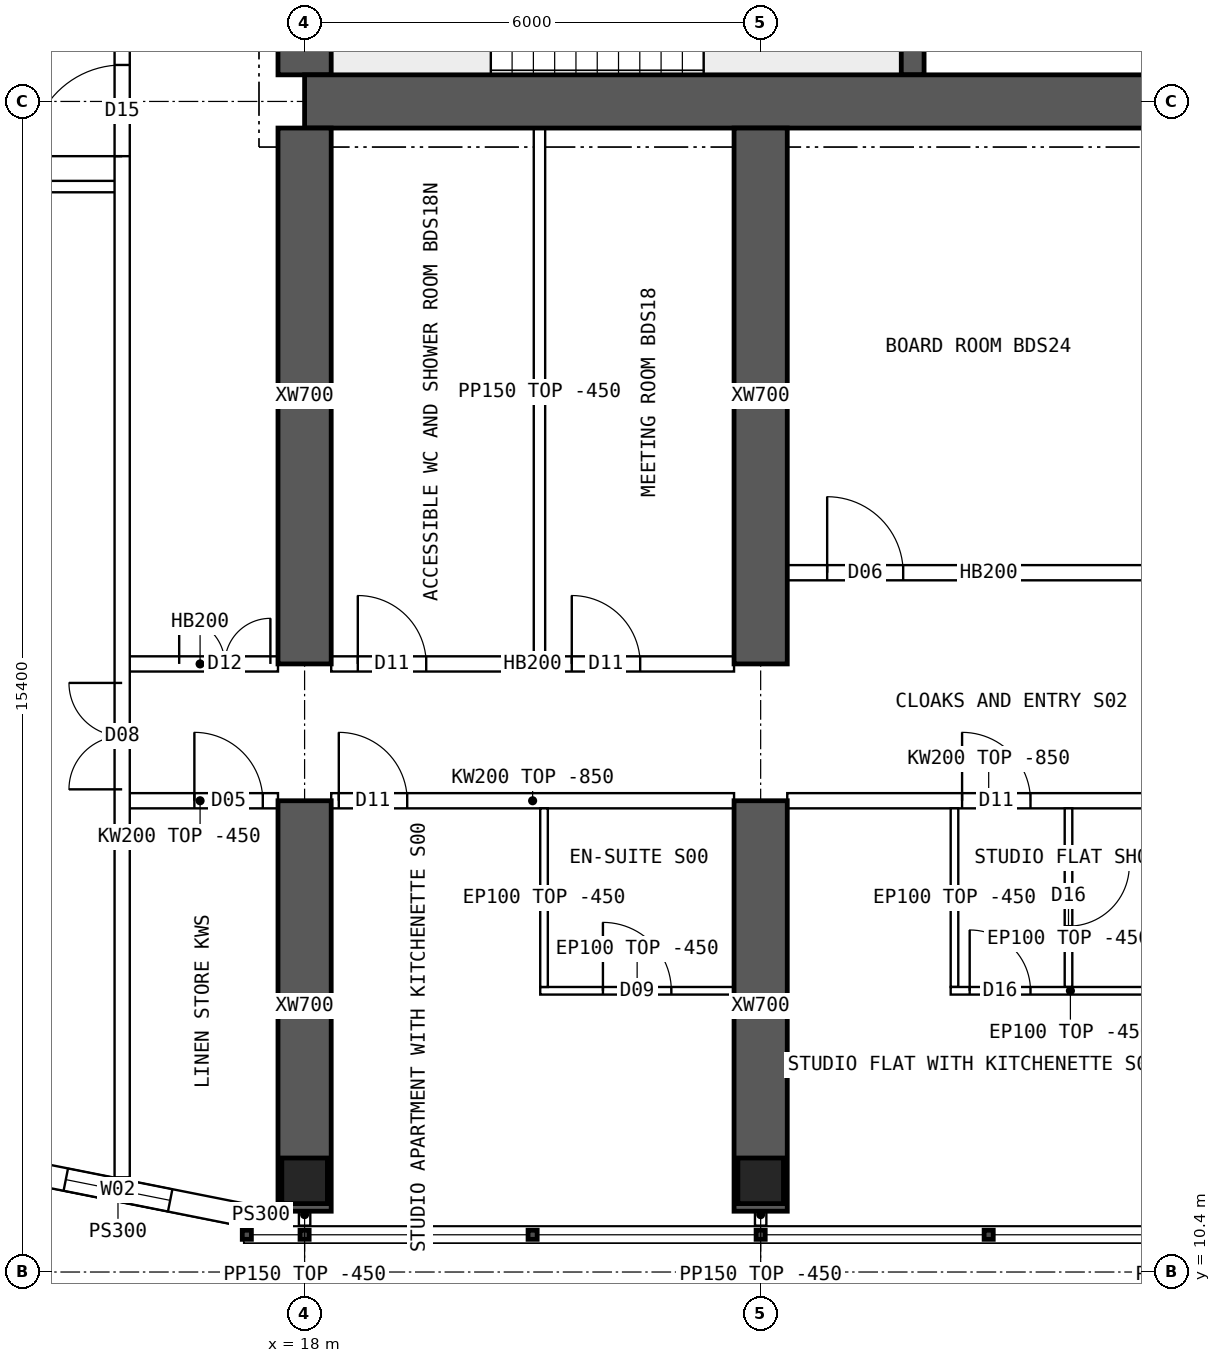
"""IFC4 building model, lengths in metres.
Left out: names, types, materials, properties, quantities, classifications, styles, units other than length and angle.
Written with IfcOpenShell. Run it as: python <this file> out.ifc"""

import sys

from ifc_helpers import new_model, si_unit, direction, frame, frame_2d, origin, origin_2d, place, context, subcontext, project, spatial, polyline, rectangle, hollow_rectangle, outline, extrude, element, fill, save


model = new_model("IFC4")
c1 = context("Model", 3, precision=1e-05, world=origin(), true_north=direction((0.0, 1.0)))
c2 = subcontext(c1, "Body", "Model", "MODEL_VIEW")
j1 = project(units=[si_unit("LENGTHUNIT", "METRE"), si_unit("PLANEANGLEUNIT", "RADIAN")], contexts=[c1])
p1 = place(None, origin())
s1 = spatial("IfcSite", under=j1, at=p1, CompositionType="ELEMENT")
p2 = place(p1, origin())
s2 = spatial("IfcBuilding", under=s1, at=p2, CompositionType="ELEMENT")
p3 = place(p2, frame((0.0, 0.0, 212.8)))
s3 = spatial("IfcBuildingStorey", under=s2, at=p3, CompositionType="ELEMENT", Elevation=212.8)
for number, where, z_axis, x_axis in (
    (1, (18.0, 11.6, 0.0), (0.0, 0.0, 1.0), (1.0, 0.0, 0.0)),
    (2, (24.0, 11.6, 0.0), (0.0, 0.0, 1.0), (1.0, 0.0, 0.0)),
):
    element("IfcColumn", number, at=place(p3, frame(where, z_axis=z_axis, x_axis=x_axis)), inside=s3, PredefinedType="COLUMN", context=c2, shape_type="SweptSolid", body=[
        extrude(hollow_rectangle(XDim=0.6, YDim=0.6, WallThickness=0.06, at=origin_2d()), origin(), (0.0, 0.0, 1.0), 3.75),
    ])
p4 = place(p3, frame((18.0, 25.8, 0.0), z_axis=(0.0, 0.0, 1.0), x_axis=(1.0, 0.0, 0.0)))
e3 = element("IfcWall", 3, at=p4, inside=s3, PredefinedType="SHEAR", context=c2, shape_type="SweptSolid", body=[
    extrude(rectangle(XDim=48.0, YDim=0.7, at=frame_2d((24.0, 0.0))), origin(), (0.0, 0.0, 1.0), 3.75),
])
p5 = place(p3, frame((18.0, 26.15, 0.0), z_axis=(0.0, 0.0, 1.0), x_axis=(0.0, 1.0, 0.0)))
e4 = element("IfcWall", 4, at=p5, inside=s3, PredefinedType="SHEAR", context=c2, shape_type="SweptSolid", body=[
    extrude(rectangle(XDim=11.7, YDim=0.7, at=frame_2d((5.85, 0.0))), origin(), (0.0, 0.0, 1.0), 3.75),
])
p6 = place(p5, frame((5.15, 0.0, 0.0)))
e5 = element("IfcOpeningElement", 5, at=p6, cuts=e4, PredefinedType="OPENING", context=c2, shape_type="SweptSolid", body=[
    extrude(rectangle(XDim=1.2, YDim=2.1, at=frame_2d((0.6, 1.05))), frame((0.0, 0.36, 0.0), z_axis=(0.0, -1.0, 0.0), x_axis=(1.0, 0.0, 0.0)), (0.0, 0.0, 1.0), 0.72),
])
p7 = place(p3, frame((26.0, 26.15, 0.0), z_axis=(0.0, 0.0, 1.0), x_axis=(0.0, 1.0, 0.0)))
e6 = element("IfcWall", 6, at=p7, inside=s3, PredefinedType="SHEAR", context=c2, shape_type="SweptSolid", body=[
    extrude(rectangle(XDim=4.1, YDim=0.3, at=frame_2d((2.05, 0.0))), origin(), (0.0, 0.0, 1.0), 3.75),
])
p8 = place(p3, frame((18.0, 11.2, 0.0), z_axis=(0.0, 0.0, 1.0), x_axis=(0.0, 1.0, 0.0)))
e7 = element("IfcWall", 7, at=p8, inside=s3, PredefinedType="SHEAR", context=c2, shape_type="SweptSolid", body=[
    extrude(rectangle(XDim=5.4, YDim=0.7, at=frame_2d((2.7, 0.0))), origin(), (0.0, 0.0, 1.0), 3.75),
])
p9 = place(p3, frame((18.0, 18.4, 0.0), z_axis=(0.0, 0.0, 1.0), x_axis=(0.0, 1.0, 0.0)))
e8 = element("IfcWall", 8, at=p9, inside=s3, PredefinedType="SHEAR", context=c2, shape_type="SweptSolid", body=[
    extrude(rectangle(XDim=7.05, YDim=0.7, at=frame_2d((3.525, 0.0))), origin(), (0.0, 0.0, 1.0), 3.75),
])
p10 = place(p3, frame((24.0, 11.2, 0.0), z_axis=(0.0, 0.0, 1.0), x_axis=(0.0, 1.0, 0.0)))
e9 = element("IfcWall", 9, at=p10, inside=s3, PredefinedType="SHEAR", context=c2, shape_type="SweptSolid", body=[
    extrude(rectangle(XDim=5.4, YDim=0.7, at=frame_2d((2.7, 0.0))), origin(), (0.0, 0.0, 1.0), 3.75),
])
p11 = place(p3, frame((24.0, 18.4, 0.0), z_axis=(0.0, 0.0, 1.0), x_axis=(0.0, 1.0, 0.0)))
e10 = element("IfcWall", 10, at=p11, inside=s3, PredefinedType="SHEAR", context=c2, shape_type="SweptSolid", body=[
    extrude(rectangle(XDim=7.05, YDim=0.7, at=frame_2d((3.525, 0.0))), origin(), (0.0, 0.0, 1.0), 3.75),
])
p12 = place(p3, frame((13.89, 11.808, 0.0), z_axis=(0.0, 0.0, 1.0), x_axis=(0.98078325777, -0.195100490205, 0.0)))
e11 = element("IfcWall", 11, at=p12, inside=s3, PredefinedType="SOLIDWALL", context=c2, shape_type="SweptSolid", body=[
    extrude(outline(polyline([(-0.03, -0.15), (3.405, -0.15), (3.345, 0.15), (0.03, 0.15), (-0.03, -0.15)])), origin(), (0.0, 0.0, 1.0), 3.3),
])
p13 = place(p12, frame((0.988, 0.0, 0.9)))
e12 = element("IfcOpeningElement", 12, at=p13, cuts=e11, PredefinedType="OPENING", context=c2, shape_type="SweptSolid", body=[
    extrude(rectangle(XDim=1.4, YDim=1.8, at=frame_2d((0.7, 0.9))), frame((0.0, 0.16, 0.0), z_axis=(0.0, -1.0, 0.0), x_axis=(1.0, 0.0, 0.0)), (0.0, 0.0, 1.0), 0.32),
])
p14 = place(p3, frame((17.2, 11.15, 0.0), z_axis=(0.0, 0.0, 1.0), x_axis=(1.0, 0.0, 0.0)))
e13 = element("IfcWall", 13, at=p14, inside=s3, PredefinedType="SOLIDWALL", context=c2, shape_type="SweptSolid", body=[
    extrude(rectangle(XDim=0.45, YDim=0.3, at=frame_2d((0.225, 0.0))), origin(), (0.0, 0.0, 1.0), 3.3),
])
p15 = place(p3, frame((15.6, 16.6, 0.0), z_axis=(0.0, 0.0, 1.0), x_axis=(1.0, 0.0, 0.0)))
e14 = element("IfcWall", 14, at=p15, inside=s3, PredefinedType="SOLIDWALL", context=c2, shape_type="SweptSolid", body=[
    extrude(rectangle(XDim=2.05, YDim=0.2, at=frame_2d((1.025, 0.0))), origin(), (0.0, 0.0, 1.0), 3.3),
])
p16 = place(p15, frame((0.95, 0.0, 0.0)))
e15 = element("IfcOpeningElement", 15, at=p16, cuts=e14, PredefinedType="OPENING", context=c2, shape_type="SweptSolid", body=[
    extrude(rectangle(XDim=0.9, YDim=2.1, at=frame_2d((0.45, 1.05))), frame((0.0, 0.11, 0.0), z_axis=(0.0, -1.0, 0.0), x_axis=(1.0, 0.0, 0.0)), (0.0, 0.0, 1.0), 0.22),
])
p17 = place(p3, frame((15.6, 18.4, 0.0), z_axis=(0.0, 0.0, 1.0), x_axis=(1.0, 0.0, 0.0)))
e16 = element("IfcWall", 16, at=p17, inside=s3, PredefinedType="SOLIDWALL", context=c2, shape_type="SweptSolid", body=[
    extrude(rectangle(XDim=2.05, YDim=0.2, at=frame_2d((1.025, 0.0))), origin(), (0.0, 0.0, 1.0), 3.3),
])
p18 = place(p17, frame((0.75, 0.0, 0.0)))
e17 = element("IfcOpeningElement", 17, at=p18, cuts=e16, PredefinedType="OPENING", context=c2, shape_type="SweptSolid", body=[
    extrude(rectangle(XDim=1.2, YDim=2.1, at=frame_2d((0.6, 1.05))), frame((0.0, 0.11, 0.0), z_axis=(0.0, -1.0, 0.0), x_axis=(1.0, 0.0, 0.0)), (0.0, 0.0, 1.0), 0.22),
])
p19 = place(p3, frame((18.35, 16.6, 0.0), z_axis=(0.0, 0.0, 1.0), x_axis=(1.0, 0.0, 0.0)))
e18 = element("IfcWall", 18, at=p19, inside=s3, PredefinedType="SOLIDWALL", context=c2, shape_type="SweptSolid", body=[
    extrude(outline(polyline([(0.0, 0.0), (5.3, 0.0), (5.3, 2.9), (0.0, 2.9), (0.0, 0.0)])), frame((0.0, 0.1, 0.0), z_axis=(0.0, -1.0, 0.0), x_axis=(1.0, 0.0, 0.0)), (0.0, 0.0, 1.0), 0.2),
])
p20 = place(p19, frame((0.1, 0.0, 0.0)))
e19 = element("IfcOpeningElement", 19, at=p20, cuts=e18, PredefinedType="OPENING", context=c2, shape_type="SweptSolid", body=[
    extrude(rectangle(XDim=0.9, YDim=2.1, at=frame_2d((0.45, 1.05))), frame((0.0, 0.11, 0.0), z_axis=(0.0, -1.0, 0.0), x_axis=(1.0, 0.0, 0.0)), (0.0, 0.0, 1.0), 0.22),
])
p21 = place(p3, frame((18.35, 18.4, 0.0), z_axis=(0.0, 0.0, 1.0), x_axis=(1.0, 0.0, 0.0)))
e20 = element("IfcWall", 20, at=p21, inside=s3, PredefinedType="SOLIDWALL", context=c2, shape_type="SweptSolid", body=[
    extrude(rectangle(XDim=5.3, YDim=0.2, at=frame_2d((2.65, 0.0))), origin(), (0.0, 0.0, 1.0), 3.3),
])
p22 = place(p21, frame((0.35, 0.0, 0.0)))
e21 = element("IfcOpeningElement", 21, at=p22, cuts=e20, PredefinedType="OPENING", context=c2, shape_type="SweptSolid", body=[
    extrude(rectangle(XDim=0.9, YDim=2.1, at=frame_2d((0.45, 1.05))), frame((0.0, 0.11, 0.0), z_axis=(0.0, -1.0, 0.0), x_axis=(1.0, 0.0, 0.0)), (0.0, 0.0, 1.0), 0.22),
])
p23 = place(p21, frame((3.165, 0.0, 0.0)))
e22 = element("IfcOpeningElement", 22, at=p23, cuts=e20, PredefinedType="OPENING", context=c2, shape_type="SweptSolid", body=[
    extrude(rectangle(XDim=0.9, YDim=2.1, at=frame_2d((0.45, 1.05))), frame((0.0, 0.11, 0.0), z_axis=(0.0, -1.0, 0.0), x_axis=(1.0, 0.0, 0.0)), (0.0, 0.0, 1.0), 0.22),
])
p24 = place(p3, frame((24.35, 16.6, 0.0), z_axis=(0.0, 0.0, 1.0), x_axis=(1.0, 0.0, 0.0)))
e23 = element("IfcWall", 23, at=p24, inside=s3, PredefinedType="SOLIDWALL", context=c2, shape_type="SweptSolid", body=[
    extrude(outline(polyline([(0.0, 0.0), (5.3, 0.0), (5.3, 2.9), (0.0, 2.9), (0.0, 0.0)])), frame((0.0, 0.1, 0.0), z_axis=(0.0, -1.0, 0.0), x_axis=(1.0, 0.0, 0.0)), (0.0, 0.0, 1.0), 0.2),
])
p25 = place(p24, frame((2.3, 0.0, 0.0)))
e24 = element("IfcOpeningElement", 24, at=p25, cuts=e23, PredefinedType="OPENING", context=c2, shape_type="SweptSolid", body=[
    extrude(rectangle(XDim=0.9, YDim=2.1, at=frame_2d((0.45, 1.05))), frame((0.0, 0.11, 0.0), z_axis=(0.0, -1.0, 0.0), x_axis=(1.0, 0.0, 0.0)), (0.0, 0.0, 1.0), 0.22),
])
p26 = place(p3, frame((23.65, 14.1, 0.0), z_axis=(0.0, 0.0, 1.0), x_axis=(-1.0, 0.0, 0.0)))
e25 = element("IfcWall", 25, at=p26, inside=s3, PredefinedType="PARTITIONING", context=c2, shape_type="SweptSolid", body=[
    extrude(rectangle(XDim=2.55, YDim=0.1, at=frame_2d((1.275, 0.0))), origin(), (0.0, 0.0, 1.0), 3.3),
])
p27 = place(p26, frame((0.825, 0.0, 0.0)))
e26 = element("IfcOpeningElement", 26, at=p27, cuts=e25, PredefinedType="OPENING", context=c2, shape_type="SweptSolid", body=[
    extrude(rectangle(XDim=0.9, YDim=2.1, at=frame_2d((0.45, 1.05))), frame((0.0, 0.06, 0.0), z_axis=(0.0, -1.0, 0.0), x_axis=(1.0, 0.0, 0.0)), (0.0, 0.0, 1.0), 0.12),
])
p28 = place(p3, frame((21.15, 14.15, 0.0), z_axis=(0.0, 0.0, 1.0), x_axis=(0.0, 1.0, 0.0)))
e27 = element("IfcWall", 27, at=p28, inside=s3, PredefinedType="PARTITIONING", context=c2, shape_type="SweptSolid", body=[
    extrude(outline(polyline([(0.0, 0.0), (2.35, 0.0), (2.35, 2.9), (2.302, 2.9), (2.3, 3.3), (0.0, 3.3), (0.0, 0.0)])), frame((0.0, 0.05, 0.0), z_axis=(0.0, -1.0, 0.0), x_axis=(1.0, 0.0, 0.0)), (0.0, 0.0, 1.0), 0.1),
])
p29 = place(p3, frame((29.65, 14.1, 0.0), z_axis=(0.0, 0.0, 1.0), x_axis=(-1.0, 0.0, 0.0)))
e28 = element("IfcWall", 28, at=p29, inside=s3, PredefinedType="PARTITIONING", context=c2, shape_type="SweptSolid", body=[
    extrude(rectangle(XDim=3.15, YDim=0.1, at=frame_2d((1.575, 0.0))), origin(), (0.0, 0.0, 1.0), 3.3),
])
p30 = place(p29, frame((2.1, 0.0, 0.0)))
e29 = element("IfcOpeningElement", 29, at=p30, cuts=e28, PredefinedType="OPENING", context=c2, shape_type="SweptSolid", body=[
    extrude(rectangle(XDim=0.8, YDim=2.1, at=frame_2d((0.4, 1.05))), frame((0.0, 0.06, 0.0), z_axis=(0.0, -1.0, 0.0), x_axis=(1.0, 0.0, 0.0)), (0.0, 0.0, 1.0), 0.12),
])
p31 = place(p3, frame((26.55, 14.15, 0.0), z_axis=(0.0, 0.0, 1.0), x_axis=(0.0, 1.0, 0.0)))
e30 = element("IfcWall", 30, at=p31, inside=s3, PredefinedType="PARTITIONING", context=c2, shape_type="SweptSolid", body=[
    extrude(outline(polyline([(0.0, 0.0), (2.35, 0.0), (2.35, 2.9), (2.302, 2.9), (2.3, 3.3), (0.0, 3.3), (0.0, 0.0)])), frame((0.0, 0.05, 0.0), z_axis=(0.0, -1.0, 0.0), x_axis=(1.0, 0.0, 0.0)), (0.0, 0.0, 1.0), 0.1),
])
p32 = place(p3, frame((28.05, 14.15, 0.0), z_axis=(0.0, 0.0, 1.0), x_axis=(0.0, 1.0, 0.0)))
e31 = element("IfcWall", 31, at=p32, inside=s3, PredefinedType="PARTITIONING", context=c2, shape_type="SweptSolid", body=[
    extrude(outline(polyline([(0.0, 0.0), (2.35, 0.0), (2.35, 2.9), (2.302, 2.9), (2.3, 3.3), (0.0, 3.3), (0.0, 0.0)])), frame((0.0, 0.05, 0.0), z_axis=(0.0, -1.0, 0.0), x_axis=(1.0, 0.0, 0.0)), (0.0, 0.0, 1.0), 0.1),
])
p33 = place(p32, frame((0.8, 0.0, 0.0)))
e32 = element("IfcOpeningElement", 32, at=p33, cuts=e31, PredefinedType="OPENING", context=c2, shape_type="SweptSolid", body=[
    extrude(rectangle(XDim=0.8, YDim=2.1, at=frame_2d((0.4, 1.05))), frame((0.0, 0.06, 0.0), z_axis=(0.0, -1.0, 0.0), x_axis=(1.0, 0.0, 0.0)), (0.0, 0.0, 1.0), 0.12),
])
p34 = place(p3, frame((21.09, 18.5, 0.0), z_axis=(0.0, 0.0, 1.0), x_axis=(0.0, 1.0, 0.0)))
e33 = element("IfcWall", 33, at=p34, inside=s3, PredefinedType="PARTITIONING", context=c2, shape_type="SweptSolid", body=[
    extrude(rectangle(XDim=6.95, YDim=0.15, at=frame_2d((3.475, 0.0))), origin(), (0.0, 0.0, 1.0), 3.3),
])
p35 = place(p3, frame((24.35, 19.6, 0.0), z_axis=(0.0, 0.0, 1.0), x_axis=(1.0, 0.0, 0.0)))
e34 = element("IfcWall", 34, at=p35, inside=s3, PredefinedType="SOLIDWALL", context=c2, shape_type="SweptSolid", body=[
    extrude(rectangle(XDim=5.3, YDim=0.2, at=frame_2d((2.65, 0.0))), origin(), (0.0, 0.0, 1.0), 3.3),
])
p36 = place(p35, frame((0.525, 0.0, 0.0)))
e35 = element("IfcOpeningElement", 35, at=p36, cuts=e34, PredefinedType="OPENING", context=c2, shape_type="SweptSolid", body=[
    extrude(rectangle(XDim=1.0, YDim=2.1, at=frame_2d((0.5, 1.05))), frame((0.0, 0.11, 0.0), z_axis=(0.0, -1.0, 0.0), x_axis=(1.0, 0.0, 0.0)), (0.0, 0.0, 1.0), 0.22),
])
p37 = place(p3, frame((15.6, 11.646, 0.0), z_axis=(0.0, 0.0, 1.0), x_axis=(0.0, 1.0, 0.0)))
e36 = element("IfcWall", 36, at=p37, inside=s3, PredefinedType="SOLIDWALL", context=c2, shape_type="SweptSolid", body=[
    extrude(rectangle(XDim=40.708, YDim=0.2, at=frame_2d((20.354, 0.0))), origin(), (0.0, 0.0, 1.0), 3.3),
])
p38 = place(p37, frame((13.434, 0.0, 0.0)))
e37 = element("IfcOpeningElement", 37, at=p38, cuts=e36, PredefinedType="OPENING", context=c2, shape_type="SweptSolid", body=[
    extrude(rectangle(XDim=1.2, YDim=2.1, at=frame_2d((0.6, 1.05))), frame((0.0, 0.11, 0.0), z_axis=(0.0, -1.0, 0.0), x_axis=(1.0, 0.0, 0.0)), (0.0, 0.0, 1.0), 0.22),
])
p39 = place(p37, frame((5.104, 0.0, 0.0)))
e38 = element("IfcOpeningElement", 38, at=p39, cuts=e36, PredefinedType="OPENING", context=c2, shape_type="SweptSolid", body=[
    extrude(rectangle(XDim=1.4, YDim=2.1, at=frame_2d((0.7, 1.05))), frame((0.0, 0.11, 0.0), z_axis=(0.0, -1.0, 0.0), x_axis=(1.0, 0.0, 0.0)), (0.0, 0.0, 1.0), 0.22),
])
p40 = place(p37, frame((34.104, 0.0, 0.0)))
e39 = element("IfcOpeningElement", 39, at=p40, cuts=e36, PredefinedType="OPENING", context=c2, shape_type="SweptSolid", body=[
    extrude(rectangle(XDim=1.4, YDim=2.1, at=frame_2d((0.7, 1.05))), frame((0.0, 0.11, 0.0), z_axis=(0.0, -1.0, 0.0), x_axis=(1.0, 0.0, 0.0)), (0.0, 0.0, 1.0), 0.22),
])
p41 = place(p3, frame((8.705, 24.68, 0.0), z_axis=(0.0, 0.0, 1.0), x_axis=(1.0, 0.0, 0.0)))
e40 = element("IfcWall", 40, at=p41, inside=s3, PredefinedType="PARTITIONING", context=c2, shape_type="SweptSolid", body=[
    extrude(rectangle(XDim=6.82, YDim=0.15, at=frame_2d((3.41, 0.0))), origin(), (0.0, 0.0, 1.0), 3.3),
])
for number, where, z_axis, x_axis in (
    (41, (18.0, 11.3, 0.0), (0.0, 0.0, 1.0), (0.0, -1.0, 0.0)),
    (42, (24.0, 11.3, 0.0), (0.0, 0.0, 1.0), (0.0, -1.0, 0.0)),
):
    element("IfcWall", number, at=place(p3, frame(where, z_axis=z_axis, x_axis=x_axis)), inside=s3, PredefinedType="PARTITIONING", context=c2, shape_type="SweptSolid", body=[
        extrude(rectangle(XDim=0.29, YDim=0.15, at=frame_2d((0.145, 0.0))), origin(), (0.0, 0.0, 1.0), 3.3),
    ])
p42 = place(p13, origin())
e43 = element("IfcWindow", 43, at=p42, inside=s3, PartitioningType="SINGLE_PANEL", PredefinedType="WINDOW", context=c2, shape_type="SweptSolid", body=[
    extrude(rectangle(XDim=1.4, YDim=1.8, at=frame_2d((0.7, 0.9))), frame((0.0, 0.03, 0.0), z_axis=(0.0, -1.0, 0.0), x_axis=(1.0, 0.0, 0.0)), (0.0, 0.0, 1.0), 0.06),
])
fill(e12, e43)
p43 = place(p18, origin())
e44 = element("IfcDoor", 44, at=p43, inside=s3, OperationType="DOUBLE_DOOR_SINGLE_SWING", PredefinedType="DOOR", context=c2, shape_type="SweptSolid", body=[
    extrude(rectangle(XDim=1.2, YDim=2.1, at=frame_2d((0.6, 1.05))), frame((0.0, 0.025, 0.0), z_axis=(0.0, -1.0, 0.0), x_axis=(1.0, 0.0, 0.0)), (0.0, 0.0, 1.0), 0.05),
])
fill(e17, e44)
p44 = place(p27, origin())
e45 = element("IfcDoor", 45, at=p44, inside=s3, OperationType="SINGLE_SWING_RIGHT", PredefinedType="DOOR", context=c2, shape_type="SweptSolid", body=[
    extrude(rectangle(XDim=0.9, YDim=2.1, at=frame_2d((0.45, 1.05))), frame((0.0, 0.025, 0.0), z_axis=(0.0, -1.0, 0.0), x_axis=(1.0, 0.0, 0.0)), (0.0, 0.0, 1.0), 0.05),
])
fill(e26, e45)
p45 = place(p20, origin())
e46 = element("IfcDoor", 46, at=p45, inside=s3, OperationType="SINGLE_SWING_LEFT", PredefinedType="DOOR", context=c2, shape_type="SweptSolid", body=[
    extrude(rectangle(XDim=0.9, YDim=2.1, at=frame_2d((0.45, 1.05))), frame((0.0, 0.025, 0.0), z_axis=(0.0, -1.0, 0.0), x_axis=(1.0, 0.0, 0.0)), (0.0, 0.0, 1.0), 0.05),
])
fill(e19, e46)
p46 = place(p30, origin())
e47 = element("IfcDoor", 47, at=p46, inside=s3, OperationType="SINGLE_SWING_RIGHT", PredefinedType="DOOR", context=c2, shape_type="SweptSolid", body=[
    extrude(rectangle(XDim=0.8, YDim=2.1, at=frame_2d((0.4, 1.05))), frame((0.0, 0.025, 0.0), z_axis=(0.0, -1.0, 0.0), x_axis=(1.0, 0.0, 0.0)), (0.0, 0.0, 1.0), 0.05),
])
fill(e29, e47)
p47 = place(p33, origin())
e48 = element("IfcDoor", 48, at=p47, inside=s3, OperationType="SINGLE_SWING_RIGHT", PredefinedType="DOOR", context=c2, shape_type="SweptSolid", body=[
    extrude(rectangle(XDim=0.8, YDim=2.1, at=frame_2d((0.4, 1.05))), frame((0.0, 0.025, 0.0), z_axis=(0.0, -1.0, 0.0), x_axis=(1.0, 0.0, 0.0)), (0.0, 0.0, 1.0), 0.05),
])
fill(e32, e48)
p48 = place(p25, origin())
e49 = element("IfcDoor", 49, at=p48, inside=s3, OperationType="SINGLE_SWING_LEFT", PredefinedType="DOOR", context=c2, shape_type="SweptSolid", body=[
    extrude(rectangle(XDim=0.9, YDim=2.1, at=frame_2d((0.45, 1.05))), frame((0.0, 0.025, 0.0), z_axis=(0.0, -1.0, 0.0), x_axis=(1.0, 0.0, 0.0)), (0.0, 0.0, 1.0), 0.05),
])
fill(e24, e49)
p49 = place(p22, origin())
e50 = element("IfcDoor", 50, at=p49, inside=s3, OperationType="SINGLE_SWING_LEFT", PredefinedType="DOOR", context=c2, shape_type="SweptSolid", body=[
    extrude(rectangle(XDim=0.9, YDim=2.1, at=frame_2d((0.45, 1.05))), frame((0.0, 0.025, 0.0), z_axis=(0.0, -1.0, 0.0), x_axis=(1.0, 0.0, 0.0)), (0.0, 0.0, 1.0), 0.05),
])
fill(e21, e50)
p50 = place(p23, origin())
e51 = element("IfcDoor", 51, at=p50, inside=s3, OperationType="SINGLE_SWING_LEFT", PredefinedType="DOOR", context=c2, shape_type="SweptSolid", body=[
    extrude(rectangle(XDim=0.9, YDim=2.1, at=frame_2d((0.45, 1.05))), frame((0.0, 0.025, 0.0), z_axis=(0.0, -1.0, 0.0), x_axis=(1.0, 0.0, 0.0)), (0.0, 0.0, 1.0), 0.05),
])
fill(e22, e51)
p51 = place(p36, origin())
e52 = element("IfcDoor", 52, at=p51, inside=s3, OperationType="SINGLE_SWING_LEFT", PredefinedType="DOOR", context=c2, shape_type="SweptSolid", body=[
    extrude(rectangle(XDim=1.0, YDim=2.1, at=frame_2d((0.5, 1.05))), frame((0.0, 0.025, 0.0), z_axis=(0.0, -1.0, 0.0), x_axis=(1.0, 0.0, 0.0)), (0.0, 0.0, 1.0), 0.05),
])
fill(e35, e52)
p52 = place(p38, origin())
e53 = element("IfcDoor", 53, at=p52, inside=s3, OperationType="SINGLE_SWING_LEFT", PredefinedType="DOOR", context=c2, shape_type="SweptSolid", body=[
    extrude(rectangle(XDim=1.2, YDim=2.1, at=frame_2d((0.6, 1.05))), frame((0.0, 0.025, 0.0), z_axis=(0.0, -1.0, 0.0), x_axis=(1.0, 0.0, 0.0)), (0.0, 0.0, 1.0), 0.05),
])
fill(e37, e53)
p53 = place(p39, origin())
e54 = element("IfcDoor", 54, at=p53, inside=s3, OperationType="DOUBLE_DOOR_SINGLE_SWING", PredefinedType="DOOR", context=c2, shape_type="SweptSolid", body=[
    extrude(rectangle(XDim=1.4, YDim=2.1, at=frame_2d((0.7, 1.05))), frame((0.0, 0.025, 0.0), z_axis=(0.0, -1.0, 0.0), x_axis=(1.0, 0.0, 0.0)), (0.0, 0.0, 1.0), 0.05),
])
fill(e38, e54)
p54 = place(p16, origin())
e55 = element("IfcDoor", 55, at=p54, inside=s3, OperationType="SINGLE_SWING_LEFT", PredefinedType="DOOR", context=c2, shape_type="SweptSolid", body=[
    extrude(rectangle(XDim=0.9, YDim=2.1, at=frame_2d((0.45, 1.05))), frame((0.0, 0.025, 0.0), z_axis=(0.0, -1.0, 0.0), x_axis=(1.0, 0.0, 0.0)), (0.0, 0.0, 1.0), 0.05),
])
fill(e15, e55)
save(model, sys.argv[1])
